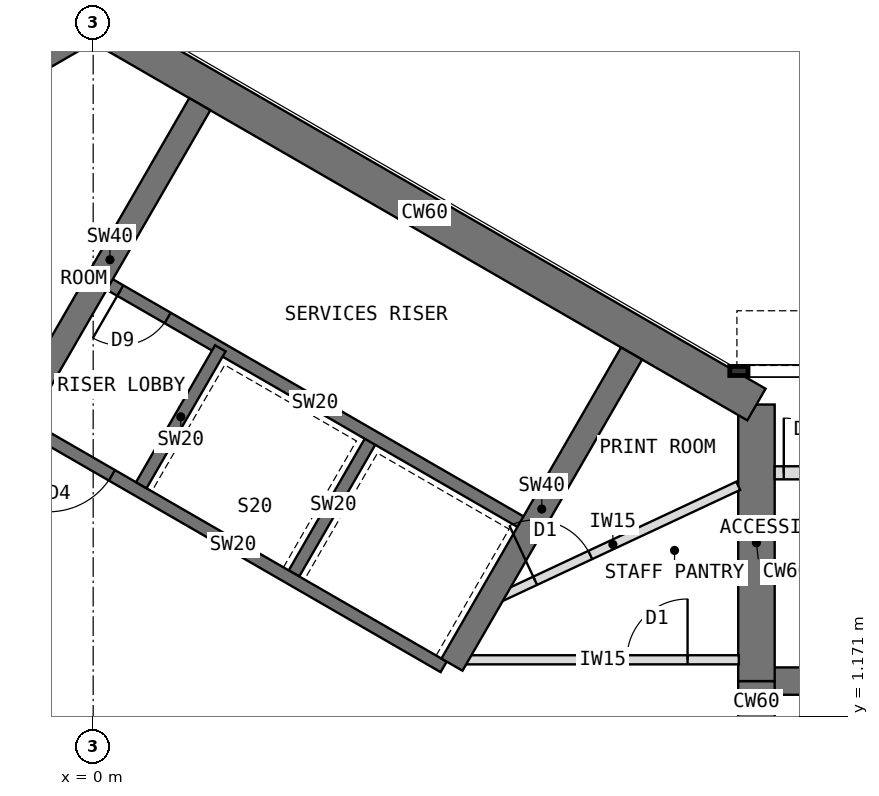
"""IFC4 building model, lengths in metres.
Left out: names, types, materials, properties, quantities, classifications, styles, units other than length and angle.
Written with IfcOpenShell. Run it as: python <this file> out.ifc"""

import sys

from ifc_helpers import new_model, si_unit, direction, frame, frame_2d, origin, place, context, subcontext, project, spatial, rectangle, extrude, element, fill, save


model = new_model("IFC4")
c1 = context("Model", 3, precision=1e-05, world=origin(), true_north=direction((0.0, 1.0)))
c2 = subcontext(c1, "Body", "Model", "MODEL_VIEW")
j1 = project(units=[si_unit("LENGTHUNIT", "METRE"), si_unit("PLANEANGLEUNIT", "RADIAN")], contexts=[c1])
p1 = place(None, origin())
s1 = spatial("IfcSite", under=j1, at=p1, CompositionType="ELEMENT")
p2 = place(p1, origin())
s2 = spatial("IfcBuilding", under=s1, at=p2, CompositionType="ELEMENT")
p3 = place(p2, frame((0.0, 0.0, 113.5)))
s3 = spatial("IfcBuildingStorey", under=s2, at=p3, CompositionType="ELEMENT", Elevation=113.5)
p4 = place(p3, frame((10.908, -1.75, 0.0), z_axis=(0.0, 0.0, 1.0), x_axis=(0.0, 1.0, 0.0)))
e1 = element("IfcWall", 1, at=p4, inside=s3, PredefinedType="SHEAR", context=c2, shape_type="SweptSolid", body=[
    extrude(rectangle(XDim=3.5, YDim=0.6, at=frame_2d((1.75, 0.0))), origin(), (0.0, 0.0, 1.0), 4.0),
])
p5 = place(p4, frame((0.85, 0.0, 0.0)))
e2 = element("IfcOpeningElement", 2, at=p5, cuts=e1, PredefinedType="OPENING", context=c2, shape_type="SweptSolid", body=[
    extrude(rectangle(XDim=1.8, YDim=2.1, at=frame_2d((0.9, 1.05))), frame((0.0, 0.31, 0.0), z_axis=(0.0, -1.0, 0.0), x_axis=(1.0, 0.0, 0.0)), (0.0, 0.0, 1.0), 0.62),
])
p6 = place(p3, frame((10.908, 1.75, 0.0), z_axis=(0.0, 0.0, 1.0), x_axis=(0.0, 1.0, 0.0)))
e3 = element("IfcWall", 3, at=p6, inside=s3, PredefinedType="SHEAR", context=c2, shape_type="SweptSolid", body=[
    extrude(rectangle(XDim=4.548, YDim=0.6, at=frame_2d((2.274, 0.0))), origin(), (0.0, 0.0, 1.0), 4.0),
])
p7 = place(p3, frame((10.908, 6.298, 0.0), z_axis=(0.0, 0.0, 1.0), x_axis=(-0.866021940709, 0.500005998175, 0.0)))
e4 = element("IfcWall", 4, at=p7, inside=s3, PredefinedType="SHEAR", context=c2, shape_type="SweptSolid", body=[
    extrude(rectangle(XDim=12.596, YDim=0.6, at=frame_2d((6.298, 0.0))), origin(), (0.0, 0.0, 1.0), 4.0),
])
p8 = place(p3, frame((0.0, 12.596, 0.0), z_axis=(0.0, 0.0, 1.0), x_axis=(-0.866011268655, -0.500024481964, 0.0)))
e5 = element("IfcWall", 5, at=p8, inside=s3, PredefinedType="SHEAR", context=c2, shape_type="SweptSolid", body=[
    extrude(rectangle(XDim=4.548, YDim=0.6, at=frame_2d((2.274, 0.0))), origin(), (0.0, 0.0, 1.0), 4.0),
])
p9 = place(p3, frame((10.908, 1.75, 0.0), z_axis=(0.0, 0.0, 1.0), x_axis=(1.0, 0.0, 0.0)))
e6 = element("IfcWall", 6, at=p9, inside=s3, PredefinedType="SHEAR", context=c2, shape_type="SweptSolid", body=[
    extrude(rectangle(XDim=2.592, YDim=0.45, at=frame_2d((1.296, 0.0))), origin(), (0.0, 0.0, 1.0), 4.0),
])
p10 = place(p3, frame((5.764, 1.984, 0.0), z_axis=(0.0, 0.0, 1.0), x_axis=(-0.866026010844, 0.49999894854, 0.0)))
e7 = element("IfcWall", 7, at=p10, inside=s3, PredefinedType="SHEAR", context=c2, shape_type="SweptSolid", body=[
    extrude(rectangle(XDim=8.0, YDim=0.2, at=frame_2d((4.0, 0.0))), origin(), (0.0, 0.0, 1.0), 4.0),
])
p11 = place(p10, frame((6.3, 0.0, 0.0)))
e8 = element("IfcOpeningElement", 8, at=p11, cuts=e7, PredefinedType="OPENING", context=c2, shape_type="SweptSolid", body=[
    extrude(rectangle(XDim=1.2, YDim=2.1, at=frame_2d((0.6, 1.05))), frame((0.0, 0.11, 0.0), z_axis=(0.0, -1.0, 0.0), x_axis=(1.0, 0.0, 0.0)), (0.0, 0.0, 1.0), 0.22),
])
for number, where, z_axis, x_axis in (
    (9, (3.303, 3.52, 0.0), (0.0, 0.0, 1.0), (0.5, 0.866, 0.0)),
    (10, (0.791, 4.97, 0.0), (0.0, 0.0, 1.0), (0.5, 0.866, 0.0)),
):
    element("IfcWall", number, at=place(p3, frame(where, z_axis=z_axis, x_axis=x_axis)), inside=s3, PredefinedType="SHEAR", context=c2, shape_type="SweptSolid", body=[
        extrude(rectangle(XDim=2.6, YDim=0.2, at=frame_2d((1.3, 0.0))), origin(), (0.0, 0.0, 1.0), 4.0),
    ])
p12 = place(p3, frame((7.114, 4.322, 0.0), z_axis=(0.0, 0.0, 1.0), x_axis=(-0.866026010844, 0.49999894854, 0.0)))
e11 = element("IfcWall", 11, at=p12, inside=s3, PredefinedType="SHEAR", context=c2, shape_type="SweptSolid", body=[
    extrude(rectangle(XDim=8.0, YDim=0.2, at=frame_2d((4.0, 0.0))), origin(), (0.0, 0.0, 1.0), 4.0),
])
p13 = place(p12, frame((6.8, 0.0, 0.0)))
e12 = element("IfcOpeningElement", 12, at=p13, cuts=e11, PredefinedType="OPENING", context=c2, shape_type="SweptSolid", body=[
    extrude(rectangle(XDim=0.9, YDim=2.1, at=frame_2d((0.45, 1.05))), frame((0.0, 0.11, 0.0), z_axis=(0.0, -1.0, 0.0), x_axis=(1.0, 0.0, 0.0)), (0.0, 0.0, 1.0), 0.22),
])
p14 = place(p3, frame((-1.201, 6.12, 0.0), z_axis=(0.0, 0.0, 1.0), x_axis=(0.49999668571, 0.866027317282, 0.0)))
e13 = element("IfcWall", 13, at=p14, inside=s3, PredefinedType="SHEAR", context=c2, shape_type="SweptSolid", body=[
    extrude(rectangle(XDim=5.908, YDim=0.4, at=frame_2d((2.954, 0.0))), origin(), (0.0, 0.0, 1.0), 4.0),
])
p15 = place(p3, frame((5.901, 2.02, 0.0), z_axis=(0.0, 0.0, 1.0), x_axis=(0.500027676417, 0.866009424208, 0.0)))
e14 = element("IfcWall", 14, at=p15, inside=s3, PredefinedType="SHEAR", context=c2, shape_type="SweptSolid", body=[
    extrude(rectangle(XDim=5.908, YDim=0.4, at=frame_2d((2.954, 0.0))), origin(), (0.0, 0.0, 1.0), 4.0),
])
p16 = place(p3, frame((11.208, 5.175, 0.0), z_axis=(0.0, 0.0, 1.0), x_axis=(1.0, 0.0, 0.0)))
e15 = element("IfcWall", 15, at=p16, inside=s3, PredefinedType="PARTITIONING", context=c2, shape_type="SweptSolid", body=[
    extrude(rectangle(XDim=2.4, YDim=0.215, at=frame_2d((1.2, 0.0))), origin(), (0.0, 0.0, 1.0), 3.8),
])
p17 = place(p16, frame((0.15, 0.0, 0.0)))
e16 = element("IfcOpeningElement", 16, at=p17, cuts=e15, PredefinedType="OPENING", context=c2, shape_type="SweptSolid", body=[
    extrude(rectangle(XDim=0.9, YDim=2.1, at=frame_2d((0.45, 1.05))), frame((0.0, 0.117, 0.0), z_axis=(0.0, -1.0, 0.0), x_axis=(1.0, 0.0, 0.0)), (0.0, 0.0, 1.0), 0.235),
])
p18 = place(p3, frame((6.143, 2.1, 0.0), z_axis=(0.0, 0.0, 1.0), x_axis=(1.0, 0.0, 0.0)))
e17 = element("IfcWall", 17, at=p18, inside=s3, PredefinedType="PARTITIONING", context=c2, shape_type="SweptSolid", body=[
    extrude(rectangle(XDim=4.476, YDim=0.15, at=frame_2d((2.238, 0.0))), origin(), (0.0, 0.0, 1.0), 3.8),
])
p19 = place(p18, frame((2.633, 0.0, 0.0)))
e18 = element("IfcOpeningElement", 18, at=p19, cuts=e17, PredefinedType="OPENING", context=c2, shape_type="SweptSolid", body=[
    extrude(rectangle(XDim=1.0, YDim=2.1, at=frame_2d((0.5, 1.05))), frame((0.0, 0.085, 0.0), z_axis=(0.0, -1.0, 0.0), x_axis=(1.0, 0.0, 0.0)), (0.0, 0.0, 1.0), 0.17),
])
p20 = place(p3, frame((6.485, 3.033, 0.0), z_axis=(0.0, 0.0, 1.0), x_axis=(0.905834774787, 0.423631161255, 0.0)))
e19 = element("IfcWall", 19, at=p20, inside=s3, PredefinedType="PARTITIONING", context=c2, shape_type="SweptSolid", body=[
    extrude(rectangle(XDim=4.552, YDim=0.15, at=frame_2d((2.276, 0.0))), origin(), (0.0, 0.0, 1.0), 3.8),
])
p21 = place(p20, frame((0.865, 0.0, 0.0)))
e20 = element("IfcOpeningElement", 20, at=p21, cuts=e19, PredefinedType="OPENING", context=c2, shape_type="SweptSolid", body=[
    extrude(rectangle(XDim=1.0, YDim=2.1, at=frame_2d((0.5, 1.05))), frame((0.0, 0.085, 0.0), z_axis=(0.0, -1.0, 0.0), x_axis=(1.0, 0.0, 0.0)), (0.0, 0.0, 1.0), 0.17),
])
p22 = place(p11, origin())
e21 = element("IfcDoor", 21, at=p22, inside=s3, OperationType="SINGLE_SWING_RIGHT", PredefinedType="DOOR", context=c2, shape_type="SweptSolid", body=[
    extrude(rectangle(XDim=1.2, YDim=2.1, at=frame_2d((0.6, 1.05))), frame((0.0, 0.025, 0.0), z_axis=(0.0, -1.0, 0.0), x_axis=(1.0, 0.0, 0.0)), (0.0, 0.0, 1.0), 0.05),
])
fill(e8, e21)
p23 = place(p13, origin())
e22 = element("IfcDoor", 22, at=p23, inside=s3, OperationType="SINGLE_SWING_RIGHT", PredefinedType="DOOR", context=c2, shape_type="SweptSolid", body=[
    extrude(rectangle(XDim=0.9, YDim=2.1, at=frame_2d((0.45, 1.05))), frame((0.0, 0.025, 0.0), z_axis=(0.0, -1.0, 0.0), x_axis=(1.0, 0.0, 0.0)), (0.0, 0.0, 1.0), 0.05),
])
fill(e12, e22)
p24 = place(p17, origin())
e23 = element("IfcDoor", 23, at=p24, inside=s3, OperationType="SINGLE_SWING_LEFT", PredefinedType="DOOR", context=c2, shape_type="SweptSolid", body=[
    extrude(rectangle(XDim=0.9, YDim=2.1, at=frame_2d((0.45, 1.05))), frame((0.0, 0.025, 0.0), z_axis=(0.0, -1.0, 0.0), x_axis=(1.0, 0.0, 0.0)), (0.0, 0.0, 1.0), 0.05),
])
fill(e16, e23)
p25 = place(p19, origin())
e24 = element("IfcDoor", 24, at=p25, inside=s3, OperationType="SINGLE_SWING_RIGHT", PredefinedType="DOOR", context=c2, shape_type="SweptSolid", body=[
    extrude(rectangle(XDim=1.0, YDim=2.1, at=frame_2d((0.5, 1.05))), frame((0.0, 0.025, 0.0), z_axis=(0.0, -1.0, 0.0), x_axis=(1.0, 0.0, 0.0)), (0.0, 0.0, 1.0), 0.05),
])
fill(e18, e24)
p26 = place(p21, origin())
e25 = element("IfcDoor", 25, at=p26, inside=s3, OperationType="SINGLE_SWING_LEFT", PredefinedType="DOOR", context=c2, shape_type="SweptSolid", body=[
    extrude(rectangle(XDim=1.0, YDim=2.1, at=frame_2d((0.5, 1.05))), frame((0.0, 0.025, 0.0), z_axis=(0.0, -1.0, 0.0), x_axis=(1.0, 0.0, 0.0)), (0.0, 0.0, 1.0), 0.05),
])
fill(e20, e25)
save(model, sys.argv[1])
